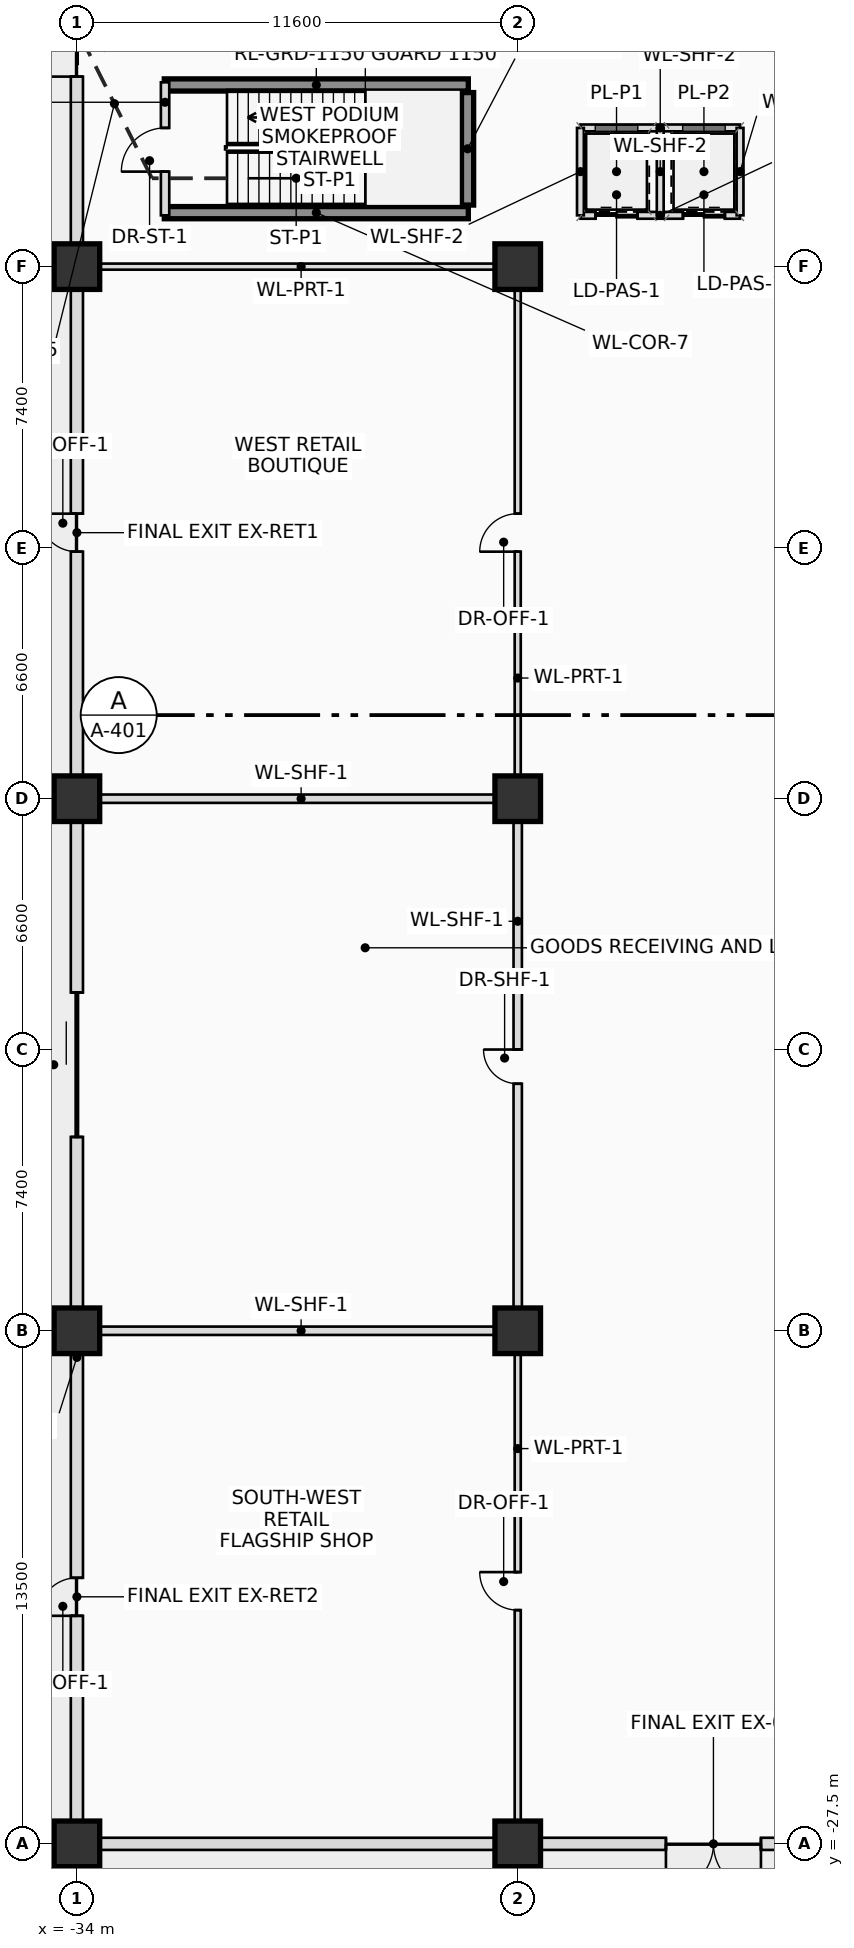
"""IFC4 building model, lengths in metres.
Left out: names, types, materials, properties, quantities, classifications, styles, units other than length and angle.
Written with IfcOpenShell. Run it as: python <this file> out.ifc"""

import sys

from ifc_helpers import new_model, si_unit, direction, frame, frame_2d, origin, origin_2d, place, context, subcontext, project, spatial, rectangle, extrude, source, transform, mapped, element, fill, save


model = new_model("IFC4")
c1 = context("Model", 3, precision=1e-05, world=origin(), true_north=direction((0.0, 1.0)))
c2 = subcontext(c1, "Body", "Model", "MODEL_VIEW")
j1 = project(units=[si_unit("LENGTHUNIT", "METRE"), si_unit("PLANEANGLEUNIT", "RADIAN")], contexts=[c1])
p1 = place(None, origin())
s1 = spatial("IfcSite", under=j1, at=p1, CompositionType="ELEMENT")
p2 = place(p1, origin())
s2 = spatial("IfcBuilding", under=s1, at=p2, CompositionType="ELEMENT")
p3 = place(p2, origin())
s3 = spatial("IfcBuildingStorey", under=s2, at=p3, CompositionType="ELEMENT", Elevation=0.0)
for number, where, z_axis, x_axis in (
    (1, (-31.7, 18.78, 0.0), (0.0, 0.0, 1.0), (1.0, 0.0, 0.0)),
    (2, (-31.7, 15.42, 0.0), (0.0, 0.0, 1.0), (1.0, 0.0, 0.0)),
):
    element("IfcWall", number, at=place(p3, frame(where, z_axis=z_axis, x_axis=x_axis)), inside=s3, PredefinedType="SHEAR", context=c2, shape_type="SweptSolid", body=[
        extrude(rectangle(XDim=8.0, YDim=0.32, at=frame_2d((4.0, 0.0))), origin(), (0.0, 0.0, 1.0), 4.5),
    ])
p4 = place(p3, frame((-23.72, 15.62, 0.0), z_axis=(0.0, 0.0, 1.0), x_axis=(0.0, 1.0, 0.0)))
e3 = element("IfcWall", 3, at=p4, inside=s3, PredefinedType="SHEAR", context=c2, shape_type="SweptSolid", body=[
    extrude(rectangle(XDim=2.96, YDim=0.32, at=frame_2d((1.48, 0.0))), origin(), (0.0, 0.0, 1.0), 4.5),
])
m1 = source(origin(), c2, "Body", "SweptSolid", [
    extrude(rectangle(XDim=1.2, YDim=1.2, at=origin_2d()), origin(), (0.0, 0.0, 1.0), 4.5),
])
for number, where, z_axis, x_axis in (
    (4, (-34.0, -27.5, 0.0), (0.0, 0.0, 1.0), (1.0, 0.0, 0.0)),
    (5, (-22.4, -27.5, 0.0), (0.0, 0.0, 1.0), (1.0, 0.0, 0.0)),
    (6, (-34.0, -14.0, 0.0), (0.0, 0.0, 1.0), (1.0, 0.0, 0.0)),
    (7, (-22.4, -14.0, 0.0), (0.0, 0.0, 1.0), (1.0, 0.0, 0.0)),
    (8, (-34.0, 0.0, 0.0), (0.0, 0.0, 1.0), (1.0, 0.0, 0.0)),
    (9, (-22.4, 0.0, 0.0), (0.0, 0.0, 1.0), (1.0, 0.0, 0.0)),
    (10, (-34.0, 14.0, 0.0), (0.0, 0.0, 1.0), (1.0, 0.0, 0.0)),
    (11, (-22.4, 14.0, 0.0), (0.0, 0.0, 1.0), (1.0, 0.0, 0.0)),
):
    element("IfcColumn", number, at=place(p3, frame(where, z_axis=z_axis, x_axis=x_axis)), inside=s3, PredefinedType="COLUMN", context=c2, shape_type="MappedRepresentation", body=[
        mapped(m1, transform((0.0, 0.0, 0.0), scale=1.0)),
    ])
p5 = place(p3, frame((34.0, -27.5, 0.0), z_axis=(0.0, 0.0, 1.0), x_axis=(-1.0, 0.0, 0.0)))
e12 = element("IfcWall", 12, at=p5, inside=s3, PredefinedType="SOLIDWALL", context=c2, shape_type="SweptSolid", body=[
    extrude(rectangle(XDim=68.0, YDim=0.32, at=frame_2d((34.0, 0.0))), origin(), (0.0, 0.0, 1.0), 3.25),
])
p6 = place(p5, frame((29.8, 0.0, 0.0)))
e13 = element("IfcOpeningElement", 13, at=p6, cuts=e12, PredefinedType="OPENING", context=c2, shape_type="SweptSolid", body=[
    extrude(rectangle(XDim=2.45, YDim=2.55, at=frame_2d((1.225, 1.275))), frame((0.0, 0.17, 0.0), z_axis=(0.0, -1.0, 0.0), x_axis=(1.0, 0.0, 0.0)), (0.0, 0.0, 1.0), 0.34),
])
p7 = place(p5, frame((50.0, 0.0, 0.0)))
e14 = element("IfcOpeningElement", 14, at=p7, cuts=e12, PredefinedType="OPENING", context=c2, shape_type="SweptSolid", body=[
    extrude(rectangle(XDim=2.5, YDim=2.6, at=frame_2d((1.25, 1.3))), frame((0.0, 0.17, 0.0), z_axis=(0.0, -1.0, 0.0), x_axis=(1.0, 0.0, 0.0)), (0.0, 0.0, 1.0), 0.34),
])
p8 = place(p3, frame((-34.0, -27.5, 0.0), z_axis=(0.0, 0.0, 1.0), x_axis=(0.0, 1.0, 0.0)))
e15 = element("IfcWall", 15, at=p8, inside=s3, PredefinedType="SOLIDWALL", context=c2, shape_type="SweptSolid", body=[
    extrude(rectangle(XDim=57.0, YDim=0.32, at=frame_2d((28.5, 0.0))), origin(), (0.0, 0.0, 1.0), 3.25),
])
p9 = place(p8, frame((6.0, 0.0, 0.0)))
e16 = element("IfcOpeningElement", 16, at=p9, cuts=e15, PredefinedType="OPENING", context=c2, shape_type="SweptSolid", body=[
    extrude(rectangle(XDim=1.0, YDim=2.25, at=frame_2d((0.5, 1.125))), frame((0.0, 0.17, 0.0), z_axis=(0.0, -1.0, 0.0), x_axis=(1.0, 0.0, 0.0)), (0.0, 0.0, 1.0), 0.34),
])
p10 = place(p8, frame((18.6, 0.0, 0.0)))
e17 = element("IfcOpeningElement", 17, at=p10, cuts=e15, PredefinedType="OPENING", context=c2, shape_type="SweptSolid", body=[
    extrude(rectangle(XDim=3.8, YDim=3.1, at=frame_2d((1.9, 1.55))), frame((0.0, 0.17, 0.0), z_axis=(0.0, -1.0, 0.0), x_axis=(1.0, 0.0, 0.0)), (0.0, 0.0, 1.0), 0.34),
])
p11 = place(p8, frame((34.0, 0.0, 0.0)))
e18 = element("IfcOpeningElement", 18, at=p11, cuts=e15, PredefinedType="OPENING", context=c2, shape_type="SweptSolid", body=[
    extrude(rectangle(XDim=1.0, YDim=2.25, at=frame_2d((0.5, 1.125))), frame((0.0, 0.17, 0.0), z_axis=(0.0, -1.0, 0.0), x_axis=(1.0, 0.0, 0.0)), (0.0, 0.0, 1.0), 0.34),
])
p12 = place(p8, frame((46.5, 0.0, 0.0)))
e19 = element("IfcOpeningElement", 19, at=p12, cuts=e15, PredefinedType="OPENING", context=c2, shape_type="SweptSolid", body=[
    extrude(rectangle(XDim=2.5, YDim=2.6, at=frame_2d((1.25, 1.3))), frame((0.0, 0.17, 0.0), z_axis=(0.0, -1.0, 0.0), x_axis=(1.0, 0.0, 0.0)), (0.0, 0.0, 1.0), 0.34),
])
p13 = place(p3, frame((-31.68, 15.35, 0.0), z_axis=(0.0, 0.0, 1.0), x_axis=(0.0, 1.0, 0.0)))
e20 = element("IfcWall", 20, at=p13, inside=s3, PredefinedType="PLUMBINGWALL", context=c2, shape_type="SweptSolid", body=[
    extrude(rectangle(XDim=3.5, YDim=0.22, at=frame_2d((1.75, 0.0))), origin(), (0.0, 0.0, 1.0), 3.9),
])
p14 = place(p13, frame((1.15, 0.0, 0.0)))
e21 = element("IfcOpeningElement", 21, at=p14, cuts=e20, PredefinedType="OPENING", context=c2, shape_type="SweptSolid", body=[
    extrude(rectangle(XDim=1.15, YDim=2.15, at=frame_2d((0.575, 1.075))), frame((0.0, 0.12, 0.0), z_axis=(0.0, -1.0, 0.0), x_axis=(1.0, 0.0, 0.0)), (0.0, 0.0, 1.0), 0.24),
])
p15 = place(p3, frame((-20.75, 15.35, 0.0), z_axis=(0.0, 0.0, 1.0), x_axis=(1.0, 0.0, 0.0)))
e22 = element("IfcWall", 22, at=p15, inside=s3, PredefinedType="PLUMBINGWALL", context=c2, shape_type="SweptSolid", body=[
    extrude(rectangle(XDim=4.2, YDim=0.18, at=frame_2d((2.1, 0.0))), origin(), (0.0, 0.0, 1.0), 4.17),
])
p16 = place(p15, frame((0.4, 0.0, 0.0)))
e23 = element("IfcOpeningElement", 23, at=p16, cuts=e22, PredefinedType="OPENING", context=c2, shape_type="SweptSolid", body=[
    extrude(rectangle(XDim=1.1, YDim=2.2, at=frame_2d((0.55, 1.1))), frame((0.0, 0.1, 0.0), z_axis=(0.0, -1.0, 0.0), x_axis=(1.0, 0.0, 0.0)), (0.0, 0.0, 1.0), 0.2),
])
p17 = place(p15, frame((2.7, 0.0, 0.0)))
e24 = element("IfcOpeningElement", 24, at=p17, cuts=e22, PredefinedType="OPENING", context=c2, shape_type="SweptSolid", body=[
    extrude(rectangle(XDim=1.1, YDim=2.2, at=frame_2d((0.55, 1.1))), frame((0.0, 0.1, 0.0), z_axis=(0.0, -1.0, 0.0), x_axis=(1.0, 0.0, 0.0)), (0.0, 0.0, 1.0), 0.2),
])
p18 = place(p3, frame((-20.75, 17.65, 0.0), z_axis=(0.0, 0.0, 1.0), x_axis=(1.0, 0.0, 0.0)))
e25 = element("IfcWall", 25, at=p18, inside=s3, PredefinedType="PLUMBINGWALL", context=c2, shape_type="SweptSolid", body=[
    extrude(rectangle(XDim=4.2, YDim=0.18, at=frame_2d((2.1, 0.0))), origin(), (0.0, 0.0, 1.0), 4.17),
])
for number, where, z_axis, x_axis in (
    (26, (-20.75, 15.35, 0.0), (0.0, 0.0, 1.0), (0.0, 1.0, 0.0)),
    (27, (-18.65, 15.35, 0.0), (0.0, 0.0, 1.0), (0.0, 1.0, 0.0)),
    (28, (-16.55, 15.35, 0.0), (0.0, 0.0, 1.0), (0.0, 1.0, 0.0)),
):
    element("IfcWall", number, at=place(p3, frame(where, z_axis=z_axis, x_axis=x_axis)), inside=s3, PredefinedType="PLUMBINGWALL", context=c2, shape_type="SweptSolid", body=[
        extrude(rectangle(XDim=2.3, YDim=0.18, at=frame_2d((1.15, 0.0))), origin(), (0.0, 0.0, 1.0), 4.17),
    ])
p19 = place(p3, frame((-22.4, -14.0, 0.0), z_axis=(0.0, 0.0, 1.0), x_axis=(0.0, 1.0, 0.0)))
e29 = element("IfcWall", 29, at=p19, inside=s3, PredefinedType="PLUMBINGWALL", context=c2, shape_type="SweptSolid", body=[
    extrude(rectangle(XDim=14.0, YDim=0.22, at=frame_2d((7.0, 0.0))), origin(), (0.0, 0.0, 1.0), 3.375),
])
p20 = place(p19, frame((6.5, 0.0, 0.0)))
e30 = element("IfcOpeningElement", 30, at=p20, cuts=e29, PredefinedType="OPENING", context=c2, shape_type="SweptSolid", body=[
    extrude(rectangle(XDim=0.9, YDim=2.05, at=frame_2d((0.45, 1.025))), frame((0.0, 0.12, 0.0), z_axis=(0.0, -1.0, 0.0), x_axis=(1.0, 0.0, 0.0)), (0.0, 0.0, 1.0), 0.24),
])
for number, where, z_axis, x_axis in (
    (31, (-33.8, 0.0, 0.0), (0.0, 0.0, 1.0), (1.0, 0.0, 0.0)),
    (32, (-33.8, -14.0, 0.0), (0.0, 0.0, 1.0), (1.0, 0.0, 0.0)),
):
    element("IfcWall", number, at=place(p3, frame(where, z_axis=z_axis, x_axis=x_axis)), inside=s3, PredefinedType="PLUMBINGWALL", context=c2, shape_type="SweptSolid", body=[
        extrude(rectangle(XDim=11.4, YDim=0.22, at=frame_2d((5.7, 0.0))), origin(), (0.0, 0.0, 1.0), 3.375),
    ])
p21 = place(p3, frame((-22.4, 0.0, 0.0), z_axis=(0.0, 0.0, 1.0), x_axis=(0.0, 1.0, 0.0)))
e33 = element("IfcWall", 33, at=p21, inside=s3, PredefinedType="PARTITIONING", context=c2, shape_type="SweptSolid", body=[
    extrude(rectangle(XDim=14.0, YDim=0.16, at=frame_2d((7.0, 0.0))), origin(), (0.0, 0.0, 1.0), 3.375),
])
p22 = place(p21, frame((6.5, 0.0, 0.0)))
e34 = element("IfcOpeningElement", 34, at=p22, cuts=e33, PredefinedType="OPENING", context=c2, shape_type="SweptSolid", body=[
    extrude(rectangle(XDim=1.0, YDim=2.25, at=frame_2d((0.5, 1.125))), frame((0.0, 0.09, 0.0), z_axis=(0.0, -1.0, 0.0), x_axis=(1.0, 0.0, 0.0)), (0.0, 0.0, 1.0), 0.18),
])
p23 = place(p3, frame((-33.8, 14.0, 0.0), z_axis=(0.0, 0.0, 1.0), x_axis=(1.0, 0.0, 0.0)))
e35 = element("IfcWall", 35, at=p23, inside=s3, PredefinedType="PARTITIONING", context=c2, shape_type="SweptSolid", body=[
    extrude(rectangle(XDim=11.4, YDim=0.16, at=frame_2d((5.7, 0.0))), origin(), (0.0, 0.0, 1.0), 3.375),
])
p24 = place(p3, frame((-22.4, -27.35, 0.0), z_axis=(0.0, 0.0, 1.0), x_axis=(0.0, 1.0, 0.0)))
e36 = element("IfcWall", 36, at=p24, inside=s3, PredefinedType="PARTITIONING", context=c2, shape_type="SweptSolid", body=[
    extrude(rectangle(XDim=13.35, YDim=0.16, at=frame_2d((6.675, 0.0))), origin(), (0.0, 0.0, 1.0), 3.375),
])
p25 = place(p24, frame((6.0, 0.0, 0.0)))
e37 = element("IfcOpeningElement", 37, at=p25, cuts=e36, PredefinedType="OPENING", context=c2, shape_type="SweptSolid", body=[
    extrude(rectangle(XDim=1.0, YDim=2.25, at=frame_2d((0.5, 1.125))), frame((0.0, 0.09, 0.0), z_axis=(0.0, -1.0, 0.0), x_axis=(1.0, 0.0, 0.0)), (0.0, 0.0, 1.0), 0.18),
])
p26 = place(p7, origin())
e38 = element("IfcDoor", 38, at=p26, inside=s3, OperationType="DOUBLE_DOOR_SINGLE_SWING", PredefinedType="DOOR", context=c2, shape_type="SweptSolid", body=[
    extrude(rectangle(XDim=2.5, YDim=2.6, at=frame_2d((1.25, 1.3))), frame((0.0, 0.025, 0.0), z_axis=(0.0, -1.0, 0.0), x_axis=(1.0, 0.0, 0.0)), (0.0, 0.0, 1.0), 0.05),
])
fill(e14, e38)
p27 = place(p9, origin())
e39 = element("IfcDoor", 39, at=p27, inside=s3, OperationType="SINGLE_SWING_LEFT", PredefinedType="DOOR", context=c2, shape_type="SweptSolid", body=[
    extrude(rectangle(XDim=1.0, YDim=2.25, at=frame_2d((0.5, 1.125))), frame((0.0, 0.025, 0.0), z_axis=(0.0, -1.0, 0.0), x_axis=(1.0, 0.0, 0.0)), (0.0, 0.0, 1.0), 0.05),
])
fill(e16, e39)
p28 = place(p10, origin())
e40 = element("IfcDoor", 40, at=p28, inside=s3, OperationType="ROLLINGUP", PredefinedType="GATE", context=c2, shape_type="SweptSolid", body=[
    extrude(rectangle(XDim=3.8, YDim=3.1, at=frame_2d((1.9, 1.55))), frame((0.0, 0.025, 0.0), z_axis=(0.0, -1.0, 0.0), x_axis=(1.0, 0.0, 0.0)), (0.0, 0.0, 1.0), 0.05),
])
fill(e17, e40)
p29 = place(p11, origin())
e41 = element("IfcDoor", 41, at=p29, inside=s3, OperationType="SINGLE_SWING_RIGHT", PredefinedType="DOOR", context=c2, shape_type="SweptSolid", body=[
    extrude(rectangle(XDim=1.0, YDim=2.25, at=frame_2d((0.5, 1.125))), frame((0.0, 0.025, 0.0), z_axis=(0.0, -1.0, 0.0), x_axis=(1.0, 0.0, 0.0)), (0.0, 0.0, 1.0), 0.05),
])
fill(e18, e41)
p30 = place(p12, origin())
e42 = element("IfcDoor", 42, at=p30, inside=s3, OperationType="DOUBLE_DOOR_SINGLE_SWING", PredefinedType="DOOR", context=c2, shape_type="SweptSolid", body=[
    extrude(rectangle(XDim=2.5, YDim=2.6, at=frame_2d((1.25, 1.3))), frame((0.0, 0.025, 0.0), z_axis=(0.0, -1.0, 0.0), x_axis=(1.0, 0.0, 0.0)), (0.0, 0.0, 1.0), 0.05),
])
fill(e19, e42)
p31 = place(p14, origin())
e43 = element("IfcDoor", 43, at=p31, inside=s3, OperationType="SINGLE_SWING_LEFT", PredefinedType="DOOR", context=c2, shape_type="SweptSolid", body=[
    extrude(rectangle(XDim=1.15, YDim=2.15, at=frame_2d((0.575, 1.075))), frame((0.0, 0.025, 0.0), z_axis=(0.0, -1.0, 0.0), x_axis=(1.0, 0.0, 0.0)), (0.0, 0.0, 1.0), 0.05),
])
fill(e21, e43)
p32 = place(p16, origin())
e44 = element("IfcDoor", 44, at=p32, inside=s3, OperationType="DOUBLE_DOOR_SLIDING", PredefinedType="DOOR", context=c2, shape_type="SweptSolid", body=[
    extrude(rectangle(XDim=1.1, YDim=2.2, at=frame_2d((0.55, 1.1))), frame((0.0, 0.025, 0.0), z_axis=(0.0, -1.0, 0.0), x_axis=(1.0, 0.0, 0.0)), (0.0, 0.0, 1.0), 0.05),
])
fill(e23, e44)
p33 = place(p17, origin())
e45 = element("IfcDoor", 45, at=p33, inside=s3, OperationType="DOUBLE_DOOR_SLIDING", PredefinedType="DOOR", context=c2, shape_type="SweptSolid", body=[
    extrude(rectangle(XDim=1.1, YDim=2.2, at=frame_2d((0.55, 1.1))), frame((0.0, 0.025, 0.0), z_axis=(0.0, -1.0, 0.0), x_axis=(1.0, 0.0, 0.0)), (0.0, 0.0, 1.0), 0.05),
])
fill(e24, e45)
p34 = place(p20, origin())
e46 = element("IfcDoor", 46, at=p34, inside=s3, OperationType="SINGLE_SWING_RIGHT", PredefinedType="DOOR", context=c2, shape_type="SweptSolid", body=[
    extrude(rectangle(XDim=0.9, YDim=2.05, at=frame_2d((0.45, 1.025))), frame((0.0, 0.025, 0.0), z_axis=(0.0, -1.0, 0.0), x_axis=(1.0, 0.0, 0.0)), (0.0, 0.0, 1.0), 0.05),
])
fill(e30, e46)
p35 = place(p22, origin())
e47 = element("IfcDoor", 47, at=p35, inside=s3, OperationType="SINGLE_SWING_LEFT", PredefinedType="DOOR", context=c2, shape_type="SweptSolid", body=[
    extrude(rectangle(XDim=1.0, YDim=2.25, at=frame_2d((0.5, 1.125))), frame((0.0, 0.025, 0.0), z_axis=(0.0, -1.0, 0.0), x_axis=(1.0, 0.0, 0.0)), (0.0, 0.0, 1.0), 0.05),
])
fill(e34, e47)
p36 = place(p25, origin())
e48 = element("IfcDoor", 48, at=p36, inside=s3, OperationType="SINGLE_SWING_RIGHT", PredefinedType="DOOR", context=c2, shape_type="SweptSolid", body=[
    extrude(rectangle(XDim=1.0, YDim=2.25, at=frame_2d((0.5, 1.125))), frame((0.0, 0.025, 0.0), z_axis=(0.0, -1.0, 0.0), x_axis=(1.0, 0.0, 0.0)), (0.0, 0.0, 1.0), 0.05),
])
fill(e37, e48)
save(model, sys.argv[1])
